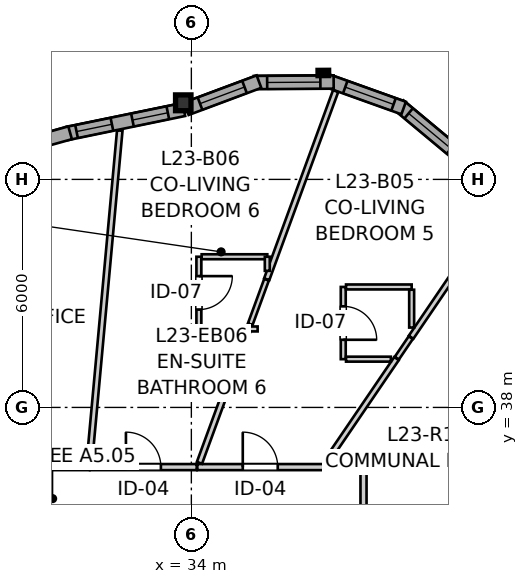
"""IFC4 building model, lengths in metres.
Left out: names, types, materials, properties, quantities, classifications, styles, units other than length and angle.
Written with IfcOpenShell. Run it as: python <this file> out.ifc"""

import sys

from ifc_helpers import new_model, si_unit, direction, frame, frame_2d, origin, origin_2d, place, context, subcontext, project, spatial, rectangle, i_section, extrude, source, transform, mapped, element, fill, save


model = new_model("IFC4")
c1 = context("Model", 3, precision=1e-05, world=origin(), true_north=direction((0.0, 1.0)))
c2 = subcontext(c1, "Body", "Model", "MODEL_VIEW")
j1 = project(units=[si_unit("LENGTHUNIT", "METRE"), si_unit("PLANEANGLEUNIT", "RADIAN")], contexts=[c1])
p1 = place(None, origin())
s1 = spatial("IfcSite", under=j1, at=p1, CompositionType="ELEMENT")
p2 = place(p1, origin())
s2 = spatial("IfcBuilding", under=s1, at=p2, CompositionType="ELEMENT")
p3 = place(p2, frame((0.0, 0.0, 80.0)))
s3 = spatial("IfcBuildingStorey", under=s2, at=p3, CompositionType="ELEMENT", Elevation=80.0)
m1 = source(origin(), c2, "Body", "SweptSolid", [
    extrude(i_section(OverallWidth=0.406, OverallDepth=0.416, WebThickness=0.027, FlangeThickness=0.044, FilletRadius=0.015, at=origin_2d()), origin(), (0.0, 0.0, 1.0), 2.935),
])
p4 = place(p3, frame((33.787, 46.015, 0.0), z_axis=(0.0, 0.0, 1.0), x_axis=(1.0, 0.0, 0.0)))
e1 = element("IfcColumn", 1, at=p4, inside=s3, PredefinedType="PILASTER", context=c2, shape_type="MappedRepresentation", body=[
    mapped(m1, transform((0.0, 0.0, 0.0), x_axis=(1.0, 0.0, 0.0), y_axis=(0.0, 1.0, 0.0), z_axis=(0.0, 0.0, 1.0), scale=1.0)),
])
p5 = place(p3, frame((41.082, 44.602, 0.0), z_axis=(0.0, 0.0, 1.0), x_axis=(-0.768497696041, 0.639852554249, 0.0)))
e2 = element("IfcWall", 2, at=p5, inside=s3, PredefinedType="SOLIDWALL", context=c2, shape_type="SweptSolid", body=[
    extrude(rectangle(XDim=2.099, YDim=0.35, at=frame_2d((1.049, 0.0))), origin(), (0.0, 0.0, 1.0), 2.465),
])
p6 = place(p5, frame((0.324, 0.0, 0.82)))
e3 = element("IfcOpeningElement", 3, at=p6, cuts=e2, PredefinedType="OPENING", context=c2, shape_type="SweptSolid", body=[
    extrude(rectangle(XDim=1.45, YDim=1.25, at=frame_2d((0.725, 0.625))), frame((0.0, 0.185, 0.0), z_axis=(0.0, -1.0, 0.0), x_axis=(1.0, 0.0, 0.0)), (0.0, 0.0, 1.0), 0.37),
])
p7 = place(p3, frame((39.586, 45.877, 0.0), z_axis=(0.0, 0.0, 1.0), x_axis=(-0.941473186867, 0.33708787936, 0.0)))
e4 = element("IfcWall", 4, at=p7, inside=s3, PredefinedType="SOLIDWALL", context=c2, shape_type="SweptSolid", body=[
    extrude(rectangle(XDim=2.099, YDim=0.35, at=frame_2d((1.049, 0.0))), origin(), (0.0, 0.0, 1.0), 2.465),
])
p8 = place(p7, frame((0.283, 0.0, 0.82)))
e5 = element("IfcOpeningElement", 5, at=p8, cuts=e4, PredefinedType="OPENING", context=c2, shape_type="SweptSolid", body=[
    extrude(rectangle(XDim=1.35, YDim=1.45, at=frame_2d((0.675, 0.725))), frame((0.0, 0.185, 0.0), z_axis=(0.0, -1.0, 0.0), x_axis=(1.0, 0.0, 0.0)), (0.0, 0.0, 1.0), 0.37),
])
p9 = place(p3, frame((37.744, 46.562, 0.0), z_axis=(0.0, 0.0, 1.0), x_axis=(-0.999976451414, -0.006862697526, 0.0)))
e6 = element("IfcWall", 6, at=p9, inside=s3, PredefinedType="SOLIDWALL", context=c2, shape_type="SweptSolid", body=[
    extrude(rectangle(XDim=2.099, YDim=0.35, at=frame_2d((1.049, 0.0))), origin(), (0.0, 0.0, 1.0), 2.465),
])
p10 = place(p9, frame((0.35, 0.0, 0.82)))
e7 = element("IfcOpeningElement", 7, at=p10, cuts=e6, PredefinedType="OPENING", context=c2, shape_type="SweptSolid", body=[
    extrude(rectangle(XDim=1.4, YDim=1.35, at=frame_2d((0.7, 0.675))), frame((0.0, 0.185, 0.0), z_axis=(0.0, -1.0, 0.0), x_axis=(1.0, 0.0, 0.0)), (0.0, 0.0, 1.0), 0.37),
])
p11 = place(p3, frame((35.779, 46.573, 0.0), z_axis=(0.0, 0.0, 1.0), x_axis=(-0.9368002254, -0.349864741994, 0.0)))
e8 = element("IfcWall", 8, at=p11, inside=s3, PredefinedType="SOLIDWALL", context=c2, shape_type="SweptSolid", body=[
    extrude(rectangle(XDim=2.041, YDim=0.35, at=frame_2d((1.021, 0.0))), origin(), (0.0, 0.0, 1.0), 2.465),
])
p12 = place(p11, frame((0.406, 0.0, 0.82)))
e9 = element("IfcOpeningElement", 9, at=p12, cuts=e8, PredefinedType="OPENING", context=c2, shape_type="SweptSolid", body=[
    extrude(rectangle(XDim=1.25, YDim=1.35, at=frame_2d((0.625, 0.675))), frame((0.0, 0.185, 0.0), z_axis=(0.0, -1.0, 0.0), x_axis=(1.0, 0.0, 0.0)), (0.0, 0.0, 1.0), 0.37),
])
p13 = place(p3, frame((33.803, 45.84, 0.0), z_axis=(0.0, 0.0, 1.0), x_axis=(-0.97943222174, -0.201773444777, 0.0)))
e10 = element("IfcWall", 10, at=p13, inside=s3, PredefinedType="SOLIDWALL", context=c2, shape_type="SweptSolid", body=[
    extrude(rectangle(XDim=3.144, YDim=0.35, at=frame_2d((1.572, 0.0))), origin(), (0.0, 0.0, 1.0), 2.465),
])
p14 = place(p13, frame((0.431, 0.0, 0.82)))
e11 = element("IfcOpeningElement", 11, at=p14, cuts=e10, PredefinedType="OPENING", context=c2, shape_type="SweptSolid", body=[
    extrude(rectangle(XDim=0.95, YDim=1.35, at=frame_2d((0.475, 0.675))), frame((0.0, 0.185, 0.0), z_axis=(0.0, -1.0, 0.0), x_axis=(1.0, 0.0, 0.0)), (0.0, 0.0, 1.0), 0.37),
])
p15 = place(p13, frame((1.933, 0.0, 0.82)))
e12 = element("IfcOpeningElement", 12, at=p15, cuts=e10, PredefinedType="OPENING", context=c2, shape_type="SweptSolid", body=[
    extrude(rectangle(XDim=0.95, YDim=1.35, at=frame_2d((0.475, 0.675))), frame((0.0, 0.185, 0.0), z_axis=(0.0, -1.0, 0.0), x_axis=(1.0, 0.0, 0.0)), (0.0, 0.0, 1.0), 0.37),
])
p16 = place(p3, frame((30.809, 45.227, 0.0), z_axis=(0.0, 0.0, 1.0), x_axis=(-0.963041637143, -0.269352566591, 0.0)))
e13 = element("IfcWall", 13, at=p16, inside=s3, PredefinedType="SOLIDWALL", context=c2, shape_type="SweptSolid", body=[
    extrude(rectangle(XDim=2.873, YDim=0.35, at=frame_2d((1.437, 0.0))), origin(), (0.0, 0.0, 1.0), 2.465),
])
p17 = place(p16, frame((0.717, 0.0, 0.82)))
e14 = element("IfcOpeningElement", 14, at=p17, cuts=e13, PredefinedType="OPENING", context=c2, shape_type="SweptSolid", body=[
    extrude(rectangle(XDim=1.45, YDim=1.25, at=frame_2d((0.725, 0.625))), frame((0.0, 0.185, 0.0), z_axis=(0.0, -1.0, 0.0), x_axis=(1.0, 0.0, 0.0)), (0.0, 0.0, 1.0), 0.37),
])
p18 = place(p3, frame((38.53, 36.43, 0.0), z_axis=(0.0, 0.0, 1.0), x_axis=(0.0, -1.0, 0.0)))
e15 = element("IfcWall", 15, at=p18, inside=s3, PredefinedType="PARTITIONING", context=c2, shape_type="SweptSolid", body=[
    extrude(rectangle(XDim=4.559, YDim=0.16, at=frame_2d((2.279, 0.0))), origin(), (0.0, 0.0, 1.0), 2.573),
])
p19 = place(p18, frame((1.646, 0.0, 0.0)))
e16 = element("IfcOpeningElement", 16, at=p19, cuts=e15, PredefinedType="OPENING", context=c2, shape_type="SweptSolid", body=[
    extrude(rectangle(XDim=1.3, YDim=2.1, at=frame_2d((0.65, 1.05))), frame((0.0, 0.09, 0.0), z_axis=(0.0, -1.0, 0.0), x_axis=(1.0, 0.0, 0.0)), (0.0, 0.0, 1.0), 0.18),
])
p20 = place(p3, frame((27.307, 36.43, 0.0), z_axis=(0.0, 0.0, 1.0), x_axis=(1.0, 0.0, 0.0)))
e17 = element("IfcWall", 17, at=p20, inside=s3, PredefinedType="PARTITIONING", context=c2, shape_type="SweptSolid", body=[
    extrude(rectangle(XDim=4.013, YDim=0.16, at=frame_2d((2.007, 0.0))), origin(), (0.0, 0.0, 1.0), 2.935),
])
p21 = place(p20, frame((0.22, 0.0, 0.0)))
e18 = element("IfcOpeningElement", 18, at=p21, cuts=e17, PredefinedType="OPENING", context=c2, shape_type="SweptSolid", body=[
    extrude(rectangle(XDim=0.96, YDim=2.1, at=frame_2d((0.48, 1.05))), frame((0.0, 0.09, 0.0), z_axis=(0.0, -1.0, 0.0), x_axis=(1.0, 0.0, 0.0)), (0.0, 0.0, 1.0), 0.18),
])
p22 = place(p3, frame((34.156, 36.43, 0.0), z_axis=(0.0, 0.0, 1.0), x_axis=(1.0, 0.0, 0.0)))
e19 = element("IfcWall", 19, at=p22, inside=s3, PredefinedType="PARTITIONING", context=c2, shape_type="SweptSolid", body=[
    extrude(rectangle(XDim=3.316, YDim=0.16, at=frame_2d((1.658, 0.0))), origin(), (0.0, 0.0, 1.0), 2.935),
])
p23 = place(p22, frame((1.197, 0.0, 0.0)))
e20 = element("IfcOpeningElement", 20, at=p23, cuts=e19, PredefinedType="OPENING", context=c2, shape_type="SweptSolid", body=[
    extrude(rectangle(XDim=0.92, YDim=2.1, at=frame_2d((0.46, 1.05))), frame((0.0, 0.09, 0.0), z_axis=(0.0, -1.0, 0.0), x_axis=(1.0, 0.0, 0.0)), (0.0, 0.0, 1.0), 0.18),
])
p24 = place(p3, frame((31.335, 36.43, 0.0), z_axis=(0.0, 0.0, 1.0), x_axis=(1.0, 0.0, 0.0)))
e21 = element("IfcWall", 21, at=p24, inside=s3, PredefinedType="PARTITIONING", context=c2, shape_type="SweptSolid", body=[
    extrude(rectangle(XDim=2.806, YDim=0.16, at=frame_2d((1.403, 0.0))), origin(), (0.0, 0.0, 1.0), 2.935),
])
p25 = place(p24, frame((0.944, 0.0, 0.0)))
e22 = element("IfcOpeningElement", 22, at=p25, cuts=e21, PredefinedType="OPENING", context=c2, shape_type="SweptSolid", body=[
    extrude(rectangle(XDim=0.92, YDim=2.1, at=frame_2d((0.46, 1.05))), frame((0.0, 0.09, 0.0), z_axis=(0.0, -1.0, 0.0), x_axis=(1.0, 0.0, 0.0)), (0.0, 0.0, 1.0), 0.18),
])
p26 = place(p3, frame((34.198, 41.965, 0.0), z_axis=(0.0, 0.0, 1.0), x_axis=(0.0, -1.0, 0.0)))
e23 = element("IfcWall", 23, at=p26, inside=s3, PredefinedType="PARTITIONING", context=c2, shape_type="SweptSolid", body=[
    extrude(rectangle(XDim=1.827, YDim=0.13, at=frame_2d((0.914, 0.0))), origin(), (0.0, 0.0, 1.0), 2.935),
])
p27 = place(p26, frame((0.51, 0.0, 0.0)))
e24 = element("IfcOpeningElement", 24, at=p27, cuts=e23, PredefinedType="OPENING", context=c2, shape_type="SweptSolid", body=[
    extrude(rectangle(XDim=0.88, YDim=2.05, at=frame_2d((0.44, 1.025))), frame((0.0, 0.075, 0.0), z_axis=(0.0, -1.0, 0.0), x_axis=(1.0, 0.0, 0.0)), (0.0, 0.0, 1.0), 0.15),
])
p28 = place(p3, frame((37.997, 41.17, 0.0), z_axis=(0.0, 0.0, 1.0), x_axis=(0.0, -1.0, 0.0)))
e25 = element("IfcWall", 25, at=p28, inside=s3, PredefinedType="PARTITIONING", context=c2, shape_type="SweptSolid", body=[
    extrude(rectangle(XDim=1.9, YDim=0.13, at=frame_2d((0.95, 0.0))), origin(), (0.0, 0.0, 1.0), 2.935),
])
p29 = place(p28, frame((0.51, 0.0, 0.0)))
e26 = element("IfcOpeningElement", 26, at=p29, cuts=e25, PredefinedType="OPENING", context=c2, shape_type="SweptSolid", body=[
    extrude(rectangle(XDim=0.88, YDim=2.05, at=frame_2d((0.44, 1.025))), frame((0.0, 0.075, 0.0), z_axis=(0.0, -1.0, 0.0), x_axis=(1.0, 0.0, 0.0)), (0.0, 0.0, 1.0), 0.15),
])
p30 = place(p3, frame((31.314, 36.525, 0.0), z_axis=(0.0, 0.0, 1.0), x_axis=(0.091226381691, 0.995830179942, 0.0)))
e27 = element("IfcWall", 27, at=p30, inside=s3, PredefinedType="PARTITIONING", context=c2, shape_type="SweptSolid", body=[
    extrude(rectangle(XDim=8.797, YDim=0.145, at=frame_2d((4.398, 0.0))), origin(), (0.0, 0.0, 1.0), 2.935),
])
p31 = place(p3, frame((38.659, 31.93, 0.0), z_axis=(0.0, 0.0, 1.0), x_axis=(0.813936175568, 0.580954302938, 0.0)))
e28 = element("IfcWall", 28, at=p31, inside=s3, PredefinedType="PARTITIONING", context=c2, shape_type="SweptSolid", body=[
    extrude(rectangle(XDim=6.346, YDim=0.145, at=frame_2d((3.173, 0.0))), origin(), (0.0, 0.0, 1.0), 2.935),
])
p32 = place(p3, frame((35.983, 41.373, 0.0), z_axis=(0.0, 0.0, 1.0), x_axis=(0.343972978133, 0.938979547335, 0.0)))
e29 = element("IfcWall", 29, at=p32, inside=s3, PredefinedType="PARTITIONING", context=c2, shape_type="SweptSolid", body=[
    extrude(rectangle(XDim=5.272, YDim=0.145, at=frame_2d((2.636, 0.0))), origin(), (0.0, 0.0, 1.0), 2.935),
])
p33 = place(p3, frame((34.213, 36.542, 0.0), z_axis=(0.0, 0.0, 1.0), x_axis=(0.343978558693, 0.93897750301, 0.0)))
e30 = element("IfcWall", 30, at=p33, inside=s3, PredefinedType="PARTITIONING", context=c2, shape_type="SweptSolid", body=[
    extrude(rectangle(XDim=3.664, YDim=0.145, at=frame_2d((1.832, 0.0))), origin(), (0.0, 0.0, 1.0), 2.935),
])
p34 = place(p3, frame((39.782, 39.847, 0.0), z_axis=(0.0, 0.0, 1.0), x_axis=(0.562744405359, 0.826630954077, 0.0)))
e31 = element("IfcWall", 31, at=p34, inside=s3, PredefinedType="PARTITIONING", context=c2, shape_type="SweptSolid", body=[
    extrude(rectangle(XDim=3.658, YDim=0.145, at=frame_2d((1.829, 0.0))), origin(), (0.0, 0.0, 1.0), 2.935),
])
p35 = place(p3, frame((37.541, 36.557, 0.0), z_axis=(0.0, 0.0, 1.0), x_axis=(0.563020017907, 0.826443258449, 0.0)))
e32 = element("IfcWall", 32, at=p35, inside=s3, PredefinedType="PARTITIONING", context=c2, shape_type="SweptSolid", body=[
    extrude(rectangle(XDim=3.3, YDim=0.145, at=frame_2d((1.65, 0.0))), origin(), (0.0, 0.0, 1.0), 2.935),
])
p36 = place(p3, frame((38.07, 41.17, 0.0), z_axis=(0.0, 0.0, 1.0), x_axis=(1.0, 0.0, 0.0)))
e33 = element("IfcWall", 33, at=p36, inside=s3, PredefinedType="PARTITIONING", context=c2, shape_type="SweptSolid", body=[
    extrude(rectangle(XDim=1.727, YDim=0.13, at=frame_2d((0.864, 0.0))), origin(), (0.0, 0.0, 1.0), 2.935),
])
p37 = place(p3, frame((34.271, 41.965, 0.0), z_axis=(0.0, 0.0, 1.0), x_axis=(1.0, 0.0, 0.0)))
e34 = element("IfcWall", 34, at=p37, inside=s3, PredefinedType="PARTITIONING", context=c2, shape_type="SweptSolid", body=[
    extrude(rectangle(XDim=1.727, YDim=0.13, at=frame_2d((0.864, 0.0))), origin(), (0.0, 0.0, 1.0), 2.103),
])
p38 = place(p3, frame((38.07, 39.27, 0.0), z_axis=(0.0, 0.0, 1.0), x_axis=(1.0, 0.0, 0.0)))
e35 = element("IfcWall", 35, at=p38, inside=s3, PredefinedType="PARTITIONING", context=c2, shape_type="SweptSolid", body=[
    extrude(rectangle(XDim=1.179, YDim=0.13, at=frame_2d((0.589, 0.0))), origin(), (0.0, 0.0, 1.0), 2.935),
])
p39 = place(p3, frame((35.549, 40.189, 0.0), z_axis=(0.0, 0.0, 1.0), x_axis=(0.344070409158, 0.938943850048, 0.0)))
e36 = element("IfcWall", 36, at=p39, inside=s3, PredefinedType="PARTITIONING", context=c2, shape_type="SweptSolid", body=[
    extrude(rectangle(XDim=1.246, YDim=0.13, at=frame_2d((0.623, 0.0))), origin(), (0.0, 0.0, 1.0), 2.935),
])
p40 = place(p3, frame((33.958, 40.065, 0.0), z_axis=(0.0, 0.0, 1.0), x_axis=(1.0, 0.0, 0.0)))
e37 = element("IfcWall", 37, at=p40, inside=s3, PredefinedType="PARTITIONING", context=c2, shape_type="SweptSolid", body=[
    extrude(rectangle(XDim=1.786, YDim=0.13, at=frame_2d((0.893, 0.0))), origin(), (0.0, 0.0, 1.0), 2.935),
])
p41 = place(p3, frame((39.797, 40.101, 0.0), z_axis=(0.0, 0.0, 1.0), x_axis=(0.0, 1.0, 0.0)))
e38 = element("IfcWall", 38, at=p41, inside=s3, PredefinedType="PARTITIONING", context=c2, shape_type="SweptSolid", body=[
    extrude(rectangle(XDim=0.996, YDim=0.13, at=frame_2d((0.498, 0.0))), origin(), (0.0, 0.0, 1.0), 2.935),
])
p42 = place(p3, frame((37.637, 36.43, 0.0), z_axis=(0.0, 0.0, 1.0), x_axis=(1.0, 0.0, 0.0)))
e39 = element("IfcWall", 39, at=p42, inside=s3, PredefinedType="PARTITIONING", context=c2, shape_type="SweptSolid", body=[
    extrude(rectangle(XDim=0.805, YDim=0.16, at=frame_2d((0.402, 0.0))), origin(), (0.0, 0.0, 1.0), 2.935),
])
p43 = place(p3, frame((39.408, 39.297, 0.0), z_axis=(0.0, 0.0, 1.0), x_axis=(0.562042989861, 0.827108020483, 0.0)))
e40 = element("IfcWall", 40, at=p43, inside=s3, PredefinedType="PARTITIONING", context=c2, shape_type="SweptSolid", body=[
    extrude(rectangle(XDim=0.65, YDim=0.13, at=frame_2d((0.325, 0.0))), origin(), (0.0, 0.0, 1.0), 2.935),
])
p44 = place(p3, frame((35.998, 41.594, 0.0), z_axis=(0.0, 0.0, 1.0), x_axis=(0.0, 1.0, 0.0)))
e41 = element("IfcWall", 41, at=p44, inside=s3, PredefinedType="PARTITIONING", context=c2, shape_type="SweptSolid", body=[
    extrude(rectangle(XDim=0.371, YDim=0.13, at=frame_2d((0.186, 0.0))), origin(), (0.0, 0.0, 1.0), 2.935),
])
m2 = source(origin(), c2, "Body", "SweptSolid", [
    extrude(rectangle(XDim=1.45, YDim=1.25, at=frame_2d((0.725, 0.625))), frame((0.0, 0.03, 0.0), z_axis=(0.0, -1.0, 0.0), x_axis=(1.0, 0.0, 0.0)), (0.0, 0.0, 1.0), 0.06),
])
p45 = place(p6, origin())
e42 = element("IfcWindow", 42, at=p45, inside=s3, PartitioningType="SINGLE_PANEL", PredefinedType="WINDOW", context=c2, shape_type="MappedRepresentation", body=[
    mapped(m2, transform((0.0, 0.0, 0.0), x_axis=(1.0, 0.0, 0.0), y_axis=(0.0, 1.0, 0.0), z_axis=(0.0, 0.0, 1.0), scale=1.0)),
])
fill(e3, e42)
m3 = source(origin(), c2, "Body", "SweptSolid", [
    extrude(rectangle(XDim=1.35, YDim=1.45, at=frame_2d((0.675, 0.725))), frame((0.0, 0.03, 0.0), z_axis=(0.0, -1.0, 0.0), x_axis=(1.0, 0.0, 0.0)), (0.0, 0.0, 1.0), 0.06),
])
p46 = place(p8, origin())
e43 = element("IfcWindow", 43, at=p46, inside=s3, PartitioningType="SINGLE_PANEL", PredefinedType="WINDOW", context=c2, shape_type="MappedRepresentation", body=[
    mapped(m3, transform((0.0, 0.0, 0.0), x_axis=(1.0, 0.0, 0.0), y_axis=(0.0, 1.0, 0.0), z_axis=(0.0, 0.0, 1.0), scale=1.0)),
])
fill(e5, e43)
m4 = source(origin(), c2, "Body", "SweptSolid", [
    extrude(rectangle(XDim=1.4, YDim=1.35, at=frame_2d((0.7, 0.675))), frame((0.0, 0.03, 0.0), z_axis=(0.0, -1.0, 0.0), x_axis=(1.0, 0.0, 0.0)), (0.0, 0.0, 1.0), 0.06),
])
p47 = place(p10, origin())
e44 = element("IfcWindow", 44, at=p47, inside=s3, PartitioningType="SINGLE_PANEL", PredefinedType="WINDOW", context=c2, shape_type="MappedRepresentation", body=[
    mapped(m4, transform((0.0, 0.0, 0.0), x_axis=(1.0, 0.0, 0.0), y_axis=(0.0, 1.0, 0.0), z_axis=(0.0, 0.0, 1.0), scale=1.0)),
])
fill(e7, e44)
m5 = source(origin(), c2, "Body", "SweptSolid", [
    extrude(rectangle(XDim=1.25, YDim=1.35, at=frame_2d((0.625, 0.675))), frame((0.0, 0.03, 0.0), z_axis=(0.0, -1.0, 0.0), x_axis=(1.0, 0.0, 0.0)), (0.0, 0.0, 1.0), 0.06),
])
p48 = place(p12, origin())
e45 = element("IfcWindow", 45, at=p48, inside=s3, PartitioningType="SINGLE_PANEL", PredefinedType="WINDOW", context=c2, shape_type="MappedRepresentation", body=[
    mapped(m5, transform((0.0, 0.0, 0.0), x_axis=(1.0, 0.0, 0.0), y_axis=(0.0, 1.0, 0.0), z_axis=(0.0, 0.0, 1.0), scale=1.0)),
])
fill(e9, e45)
m6 = source(origin(), c2, "Body", "SweptSolid", [
    extrude(rectangle(XDim=0.95, YDim=1.35, at=frame_2d((0.475, 0.675))), frame((0.0, 0.03, 0.0), z_axis=(0.0, -1.0, 0.0), x_axis=(1.0, 0.0, 0.0)), (0.0, 0.0, 1.0), 0.06),
])
p49 = place(p14, origin())
e46 = element("IfcWindow", 46, at=p49, inside=s3, PartitioningType="SINGLE_PANEL", PredefinedType="WINDOW", context=c2, shape_type="MappedRepresentation", body=[
    mapped(m6, transform((0.0, 0.0, 0.0), x_axis=(1.0, 0.0, 0.0), y_axis=(0.0, 1.0, 0.0), z_axis=(0.0, 0.0, 1.0), scale=1.0)),
])
fill(e11, e46)
p50 = place(p15, origin())
e47 = element("IfcWindow", 47, at=p50, inside=s3, PartitioningType="SINGLE_PANEL", PredefinedType="WINDOW", context=c2, shape_type="MappedRepresentation", body=[
    mapped(m6, transform((0.0, 0.0, 0.0), x_axis=(1.0, 0.0, 0.0), y_axis=(0.0, 1.0, 0.0), z_axis=(0.0, 0.0, 1.0), scale=1.0)),
])
fill(e12, e47)
m7 = source(origin(), c2, "Body", "SweptSolid", [
    extrude(rectangle(XDim=0.92, YDim=2.1, at=frame_2d((0.46, 1.05))), frame((0.0, 0.025, 0.0), z_axis=(0.0, -1.0, 0.0), x_axis=(1.0, 0.0, 0.0)), (0.0, 0.0, 1.0), 0.05),
])
p51 = place(p23, origin())
e48 = element("IfcDoor", 48, at=p51, inside=s3, OperationType="SINGLE_SWING_LEFT", PredefinedType="DOOR", context=c2, shape_type="MappedRepresentation", body=[
    mapped(m7, transform((0.0, 0.0, 0.0), x_axis=(1.0, 0.0, 0.0), y_axis=(0.0, 1.0, 0.0), z_axis=(0.0, 0.0, 1.0), scale=1.0)),
])
fill(e20, e48)
p52 = place(p25, origin())
e49 = element("IfcDoor", 49, at=p52, inside=s3, OperationType="SINGLE_SWING_LEFT", PredefinedType="DOOR", context=c2, shape_type="MappedRepresentation", body=[
    mapped(m7, transform((0.0, 0.0, 0.0), x_axis=(1.0, 0.0, 0.0), y_axis=(0.0, 1.0, 0.0), z_axis=(0.0, 0.0, 1.0), scale=1.0)),
])
fill(e22, e49)
m8 = source(origin(), c2, "Body", "SweptSolid", [
    extrude(rectangle(XDim=0.88, YDim=2.05, at=frame_2d((0.44, 1.025))), frame((0.0, 0.025, 0.0), z_axis=(0.0, -1.0, 0.0), x_axis=(1.0, 0.0, 0.0)), (0.0, 0.0, 1.0), 0.05),
])
p53 = place(p27, origin())
e50 = element("IfcDoor", 50, at=p53, inside=s3, OperationType="SINGLE_SWING_LEFT", PredefinedType="DOOR", context=c2, shape_type="MappedRepresentation", body=[
    mapped(m8, transform((0.0, 0.0, 0.0), x_axis=(1.0, 0.0, 0.0), y_axis=(0.0, 1.0, 0.0), z_axis=(0.0, 0.0, 1.0), scale=1.0)),
])
fill(e24, e50)
p54 = place(p29, origin())
e51 = element("IfcDoor", 51, at=p54, inside=s3, OperationType="SINGLE_SWING_RIGHT", PredefinedType="DOOR", context=c2, shape_type="MappedRepresentation", body=[
    mapped(m8, transform((0.0, 0.0, 0.0), x_axis=(1.0, 0.0, 0.0), y_axis=(0.0, 1.0, 0.0), z_axis=(0.0, 0.0, 1.0), scale=1.0)),
])
fill(e26, e51)
save(model, sys.argv[1])
